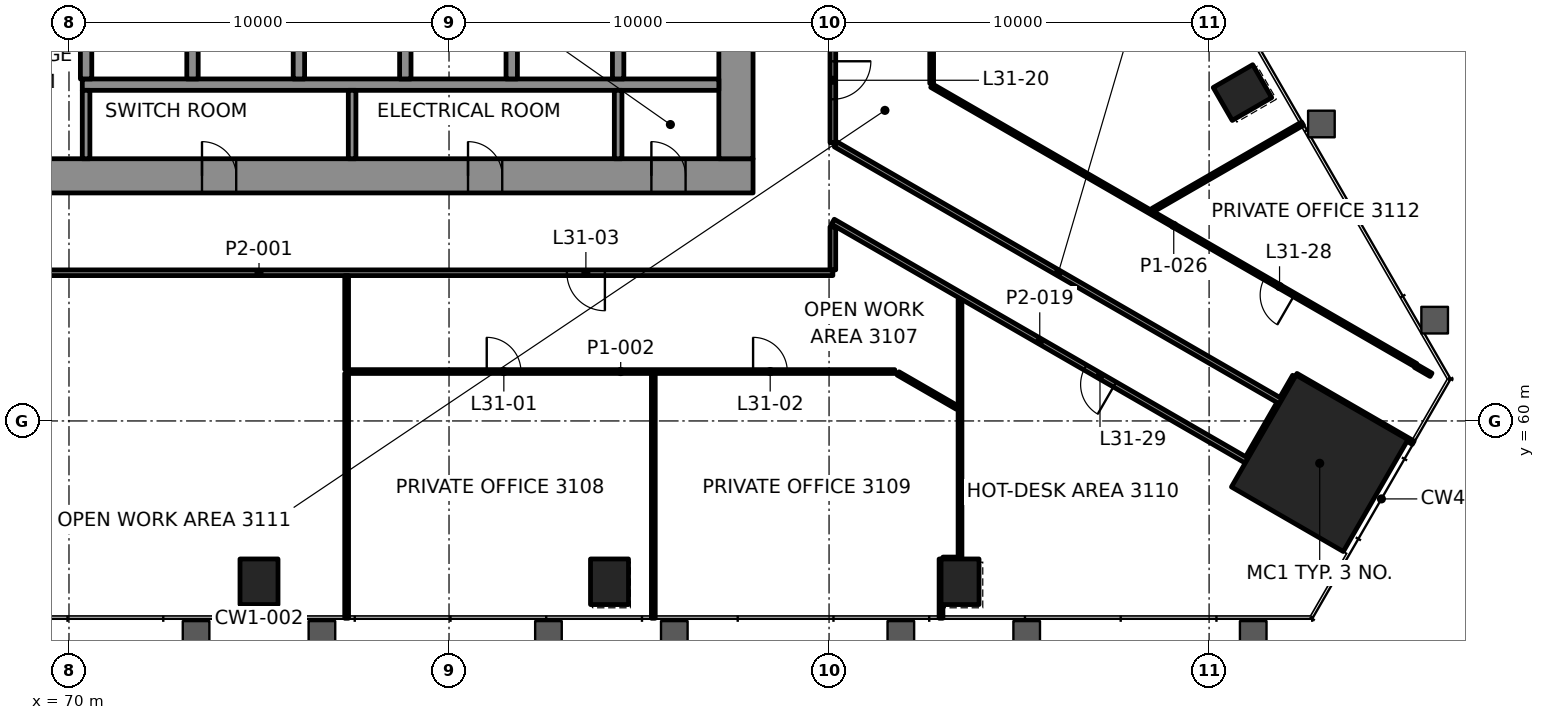
"""IFC4 building model, lengths in metres.
Left out: names, types, materials, properties, quantities, classifications, styles, units other than length and angle.
Written with IfcOpenShell. Run it as: python <this file> out.ifc"""

import sys

from ifc_helpers import new_model, si_unit, direction, frame, frame_2d, origin, origin_2d, place, context, subcontext, project, spatial, rectangle, extrude, element, fill, save


model = new_model("IFC4")
c1 = context("Model", 3, precision=1e-05, world=origin(), true_north=direction((0.0, 1.0)))
c2 = subcontext(c1, "Body", "Model", "MODEL_VIEW")
j1 = project(units=[si_unit("LENGTHUNIT", "METRE"), si_unit("PLANEANGLEUNIT", "RADIAN")], contexts=[c1])
p1 = place(None, origin())
s1 = spatial("IfcSite", under=j1, at=p1, CompositionType="ELEMENT")
p2 = place(p1, origin())
s2 = spatial("IfcBuilding", under=s1, at=p2, CompositionType="ELEMENT")
p3 = place(p2, frame((0.0, 0.0, 136.6)))
s3 = spatial("IfcBuildingStorey", under=s2, at=p3, CompositionType="ELEMENT", Elevation=136.6)
p4 = place(p3, frame((102.911, 58.886, 0.0), z_axis=(0.0, 0.0, 1.0), x_axis=(0.5, 0.866025403784, 0.0)))
e1 = element("IfcColumn", 1, at=p4, inside=s3, PredefinedType="COLUMN", context=c2, shape_type="SweptSolid", body=[
    extrude(rectangle(XDim=3.4, YDim=3.4, at=origin_2d()), origin(), (0.0, 0.0, 1.0), 4.2),
])
for number, where, z_axis, x_axis in (
    (2, (75.0, 55.768, -0.0), (0.0, 0.0, 1.0), (1.0, 0.0, 0.0)),
    (3, (84.223, 55.768, -0.0), (0.0, 0.0, 1.0), (1.0, 0.0, 0.0)),
    (4, (93.446, 55.768, -0.0), (0.0, 0.0, 1.0), (1.0, 0.0, 0.0)),
    (5, (100.878, 68.641, -0.0), (0.0, 0.0, 1.0), (-0.5, 0.866, 0.0)),
):
    element("IfcColumn", number, at=place(p3, frame(where, z_axis=z_axis, x_axis=x_axis)), inside=s3, PredefinedType="COLUMN", context=c2, shape_type="SweptSolid", body=[
        extrude(rectangle(XDim=1.0, YDim=1.2, at=origin_2d()), origin(), (0.0, 0.0, 1.0), 4.2),
    ])
p5 = place(p3, frame((62.0, 66.45, 0.0), z_axis=(0.0, 0.0, 1.0), x_axis=(1.0, 0.0, 0.0)))
e6 = element("IfcWall", 6, at=p5, inside=s3, PredefinedType="SHEAR", context=c2, shape_type="SweptSolid", body=[
    extrude(rectangle(XDim=26.0, YDim=0.9, at=frame_2d((13.0, 0.0))), origin(), (0.0, 0.0, 1.0), 3.9),
])
p6 = place(p5, frame((3.45, 0.0, 0.0)))
e7 = element("IfcOpeningElement", 7, at=p6, cuts=e6, PredefinedType="OPENING", context=c2, shape_type="SweptSolid", body=[
    extrude(rectangle(XDim=0.9, YDim=2.1, at=frame_2d((0.45, 1.05))), frame((0.0, 0.46, 0.0), z_axis=(0.0, -1.0, 0.0), x_axis=(1.0, 0.0, 0.0)), (0.0, 0.0, 1.0), 0.92),
])
p7 = place(p5, frame((6.425, 0.0, 0.0)))
e8 = element("IfcOpeningElement", 8, at=p7, cuts=e6, PredefinedType="OPENING", context=c2, shape_type="SweptSolid", body=[
    extrude(rectangle(XDim=0.9, YDim=2.1, at=frame_2d((0.45, 1.05))), frame((0.0, 0.46, 0.0), z_axis=(0.0, -1.0, 0.0), x_axis=(1.0, 0.0, 0.0)), (0.0, 0.0, 1.0), 0.92),
])
p8 = place(p5, frame((11.5, 0.0, 0.0)))
e9 = element("IfcOpeningElement", 9, at=p8, cuts=e6, PredefinedType="OPENING", context=c2, shape_type="SweptSolid", body=[
    extrude(rectangle(XDim=0.9, YDim=2.1, at=frame_2d((0.45, 1.05))), frame((0.0, 0.46, 0.0), z_axis=(0.0, -1.0, 0.0), x_axis=(1.0, 0.0, 0.0)), (0.0, 0.0, 1.0), 0.92),
])
p9 = place(p5, frame((18.5, 0.0, 0.0)))
e10 = element("IfcOpeningElement", 10, at=p9, cuts=e6, PredefinedType="OPENING", context=c2, shape_type="SweptSolid", body=[
    extrude(rectangle(XDim=0.9, YDim=2.1, at=frame_2d((0.45, 1.05))), frame((0.0, 0.46, 0.0), z_axis=(0.0, -1.0, 0.0), x_axis=(1.0, 0.0, 0.0)), (0.0, 0.0, 1.0), 0.92),
])
p10 = place(p5, frame((23.325, 0.0, 0.0)))
e11 = element("IfcOpeningElement", 11, at=p10, cuts=e6, PredefinedType="OPENING", context=c2, shape_type="SweptSolid", body=[
    extrude(rectangle(XDim=0.9, YDim=2.1, at=frame_2d((0.45, 1.05))), frame((0.0, 0.46, 0.0), z_axis=(0.0, -1.0, 0.0), x_axis=(1.0, 0.0, 0.0)), (0.0, 0.0, 1.0), 0.92),
])
p11 = place(p3, frame((87.55, 66.9, 0.0), z_axis=(0.0, 0.0, 1.0), x_axis=(0.0, 1.0, 0.0)))
e12 = element("IfcWall", 12, at=p11, inside=s3, PredefinedType="SHEAR", context=c2, shape_type="SweptSolid", body=[
    extrude(rectangle(XDim=16.2, YDim=0.9, at=frame_2d((8.1, 0.0))), origin(), (0.0, 0.0, 1.0), 3.9),
])
p12 = place(p11, frame((5.5, 0.0, 0.0)))
e13 = element("IfcOpeningElement", 13, at=p12, cuts=e12, PredefinedType="OPENING", context=c2, shape_type="SweptSolid", body=[
    extrude(rectangle(XDim=1.8, YDim=2.1, at=frame_2d((0.9, 1.05))), frame((0.0, 0.46, 0.0), z_axis=(0.0, -1.0, 0.0), x_axis=(1.0, 0.0, 0.0)), (0.0, 0.0, 1.0), 0.92),
])
p13 = place(p11, frame((12.272, 0.0, 0.0)))
e14 = element("IfcOpeningElement", 14, at=p13, cuts=e12, PredefinedType="OPENING", context=c2, shape_type="SweptSolid", body=[
    extrude(rectangle(XDim=0.9, YDim=2.1, at=frame_2d((0.45, 1.05))), frame((0.0, 0.46, 0.0), z_axis=(0.0, -1.0, 0.0), x_axis=(1.0, 0.0, 0.0)), (0.0, 0.0, 1.0), 0.92),
])
p14 = place(p3, frame((70.35, 68.85, 0.0), z_axis=(0.0, 0.0, 1.0), x_axis=(1.0, 0.0, 0.0)))
e15 = element("IfcWall", 15, at=p14, inside=s3, PredefinedType="SHEAR", context=c2, shape_type="SweptSolid", body=[
    extrude(rectangle(XDim=16.75, YDim=0.3, at=frame_2d((8.375, 0.0))), origin(), (0.0, 0.0, 1.0), 3.9),
])
for number, where, z_axis, x_axis in (
    (16, (70.45, 69.0, 0.0), (0.0, 0.0, 1.0), (0.0, 1.0, 0.0)),
    (17, (73.25, 69.0, 0.0), (0.0, 0.0, 1.0), (0.0, 1.0, 0.0)),
    (18, (76.05, 69.0, 0.0), (0.0, 0.0, 1.0), (0.0, 1.0, 0.0)),
    (19, (78.85, 69.0, 0.0), (0.0, 0.0, 1.0), (0.0, 1.0, 0.0)),
    (20, (81.65, 69.0, 0.0), (0.0, 0.0, 1.0), (0.0, 1.0, 0.0)),
    (21, (84.45, 69.0, 0.0), (0.0, 0.0, 1.0), (0.0, 1.0, 0.0)),
):
    element("IfcWall", number, at=place(p3, frame(where, z_axis=z_axis, x_axis=x_axis)), inside=s3, PredefinedType="SHEAR", context=c2, shape_type="SweptSolid", body=[
        extrude(rectangle(XDim=2.6, YDim=0.3, at=frame_2d((1.3, 0.0))), origin(), (0.0, 0.0, 1.0), 3.9),
    ])
p15 = place(p3, frame((92.997, 56.368, 0.0), z_axis=(0.0, 0.0, 1.0), x_axis=(1.0, 0.0, 0.0)))
e22 = element("IfcWall", 22, at=p15, inside=s3, PredefinedType="PARTITIONING", context=c2, shape_type="SweptSolid", body=[
    extrude(rectangle(XDim=0.399, YDim=0.1, at=frame_2d((0.199, 0.0))), origin(), (0.0, 0.0, 1.0), 3.3),
])
p16 = place(p3, frame((77.306, 61.3, 0.0), z_axis=(0.0, 0.0, 1.0), x_axis=(1.0, 0.0, 0.0)))
e23 = element("IfcWall", 23, at=p16, inside=s3, PredefinedType="PARTITIONING", context=c2, shape_type="SweptSolid", body=[
    extrude(rectangle(XDim=14.423, YDim=0.1, at=frame_2d((7.211, 0.0))), origin(), (0.0, 0.0, 1.0), 3.3),
])
p17 = place(p16, frame((3.687, 0.0, 0.0)))
e24 = element("IfcOpeningElement", 24, at=p17, cuts=e23, PredefinedType="OPENING", context=c2, shape_type="SweptSolid", body=[
    extrude(rectangle(XDim=0.9, YDim=2.1, at=frame_2d((0.45, 1.05))), frame((0.0, 0.06, 0.0), z_axis=(0.0, -1.0, 0.0), x_axis=(1.0, 0.0, 0.0)), (0.0, 0.0, 1.0), 0.12),
])
p18 = place(p16, frame((10.695, 0.0, 0.0)))
e25 = element("IfcOpeningElement", 25, at=p18, cuts=e23, PredefinedType="OPENING", context=c2, shape_type="SweptSolid", body=[
    extrude(rectangle(XDim=0.9, YDim=2.1, at=frame_2d((0.45, 1.05))), frame((0.0, 0.06, 0.0), z_axis=(0.0, -1.0, 0.0), x_axis=(1.0, 0.0, 0.0)), (0.0, 0.0, 1.0), 0.12),
])
p19 = place(p3, frame((90.1, 63.9, 0.0), z_axis=(0.0, 0.0, 1.0), x_axis=(-1.0, 0.0, 0.0)))
e26 = element("IfcWall", 26, at=p19, inside=s3, PredefinedType="PARTITIONING", context=c2, shape_type="SweptSolid", body=[
    extrude(rectangle(XDim=30.199, YDim=0.15, at=frame_2d((15.1, 0.0))), origin(), (0.0, 0.0, 1.0), 3.3),
])
p20 = place(p19, frame((5.999, 0.0, 0.0)))
e27 = element("IfcOpeningElement", 27, at=p20, cuts=e26, PredefinedType="OPENING", context=c2, shape_type="SweptSolid", body=[
    extrude(rectangle(XDim=1.0, YDim=2.1, at=frame_2d((0.5, 1.05))), frame((0.0, 0.085, 0.0), z_axis=(0.0, -1.0, 0.0), x_axis=(1.0, 0.0, 0.0)), (0.0, 0.0, 1.0), 0.17),
])
p21 = place(p19, frame((20.795, 0.0, 0.0)))
e28 = element("IfcOpeningElement", 28, at=p21, cuts=e26, PredefinedType="OPENING", context=c2, shape_type="SweptSolid", body=[
    extrude(rectangle(XDim=1.2, YDim=2.1, at=frame_2d((0.6, 1.05))), frame((0.0, 0.085, 0.0), z_axis=(0.0, -1.0, 0.0), x_axis=(1.0, 0.0, 0.0)), (0.0, 0.0, 1.0), 0.17),
])
p22 = place(p3, frame((98.52, 65.55, 0.0), z_axis=(0.0, 0.0, 1.0), x_axis=(0.866021092682, 0.500007466975, 0.0)))
e29 = element("IfcWall", 29, at=p22, inside=s3, PredefinedType="PARTITIONING", context=c2, shape_type="SweptSolid", body=[
    extrude(rectangle(XDim=4.548, YDim=0.1, at=frame_2d((2.274, 0.0))), origin(), (0.0, 0.0, 1.0), 3.3),
])
p23 = place(p3, frame((101.026, 59.022, 0.0), z_axis=(0.0, 0.0, 1.0), x_axis=(0.499991515992, 0.866030301974, 0.0)))
e30 = element("IfcWall", 30, at=p23, inside=s3, PredefinedType="PARTITIONING", context=c2, shape_type="SweptSolid", body=[
    extrude(rectangle(XDim=1.649, YDim=0.15, at=frame_2d((0.825, 0.0))), origin(), (0.0, 0.0, 1.0), 3.147),
])
p24 = place(p3, frame((93.446, 56.369, 0.0), z_axis=(0.0, 0.0, 1.0), x_axis=(0.0, 1.0, 0.0)))
e31 = element("IfcWall", 31, at=p24, inside=s3, PredefinedType="PARTITIONING", context=c2, shape_type="SweptSolid", body=[
    extrude(rectangle(XDim=6.825, YDim=0.1, at=frame_2d((3.413, 0.0))), origin(), (0.0, 0.0, 1.0), 3.3),
])
p25 = place(p3, frame((92.946, 54.808, 0.0), z_axis=(0.0, 0.0, 1.0), x_axis=(0.0, 1.0, 0.0)))
e32 = element("IfcWall", 32, at=p25, inside=s3, PredefinedType="PARTITIONING", context=c2, shape_type="SweptSolid", body=[
    extrude(rectangle(XDim=1.56, YDim=0.1, at=frame_2d((0.78, 0.0))), origin(), (0.0, 0.0, 1.0), 3.065),
])
p26 = place(p3, frame((92.7, 71.818, 0.0), z_axis=(0.0, 0.0, 1.0), x_axis=(0.0, -1.0, 0.0)))
e33 = element("IfcWall", 33, at=p26, inside=s3, PredefinedType="PARTITIONING", context=c2, shape_type="SweptSolid", body=[
    extrude(rectangle(XDim=2.938, YDim=0.1, at=frame_2d((1.469, 0.0))), origin(), (0.0, 0.0, 1.0), 3.3),
])
p27 = place(p26, frame((1.019, 0.0, 0.0)))
e34 = element("IfcOpeningElement", 34, at=p27, cuts=e33, PredefinedType="OPENING", context=c2, shape_type="SweptSolid", body=[
    extrude(rectangle(XDim=0.9, YDim=2.1, at=frame_2d((0.45, 1.05))), frame((0.0, 0.06, 0.0), z_axis=(0.0, -1.0, 0.0), x_axis=(1.0, 0.0, 0.0)), (0.0, 0.0, 1.0), 0.12),
])
p28 = place(p3, frame((90.1, 63.975, 0.0), z_axis=(0.0, 0.0, 1.0), x_axis=(0.0, 1.0, 0.0)))
e35 = element("IfcWall", 35, at=p28, inside=s3, PredefinedType="PARTITIONING", context=c2, shape_type="SweptSolid", body=[
    extrude(rectangle(XDim=1.131, YDim=0.15, at=frame_2d((0.565, 0.0))), origin(), (0.0, 0.0, 1.0), 3.147),
])
p29 = place(p3, frame((90.1, 86.1, 0.0), z_axis=(0.0, 0.0, 1.0), x_axis=(0.0, -1.0, 0.0)))
e36 = element("IfcWall", 36, at=p29, inside=s3, PredefinedType="PARTITIONING", context=c2, shape_type="SweptSolid", body=[
    extrude(rectangle(XDim=18.779, YDim=0.15, at=frame_2d((9.389, 0.0))), origin(), (0.0, 0.0, 1.0), 3.3),
])
p30 = place(p29, frame((0.083, 0.0, 0.0)))
e37 = element("IfcOpeningElement", 37, at=p30, cuts=e36, PredefinedType="OPENING", context=c2, shape_type="SweptSolid", body=[
    extrude(rectangle(XDim=0.8, YDim=2.1, at=frame_2d((0.4, 1.05))), frame((0.0, 0.085, 0.0), z_axis=(0.0, -1.0, 0.0), x_axis=(1.0, 0.0, 0.0)), (0.0, 0.0, 1.0), 0.17),
])
p31 = place(p29, frame((8.588, 0.0, 0.0)))
e38 = element("IfcOpeningElement", 38, at=p31, cuts=e36, PredefinedType="OPENING", context=c2, shape_type="SweptSolid", body=[
    extrude(rectangle(XDim=0.9, YDim=2.1, at=frame_2d((0.45, 1.05))), frame((0.0, 0.085, 0.0), z_axis=(0.0, -1.0, 0.0), x_axis=(1.0, 0.0, 0.0)), (0.0, 0.0, 1.0), 0.17),
])
p32 = place(p29, frame((16.635, 0.0, 0.0)))
e39 = element("IfcOpeningElement", 39, at=p32, cuts=e36, PredefinedType="OPENING", context=c2, shape_type="SweptSolid", body=[
    extrude(rectangle(XDim=1.0, YDim=2.1, at=frame_2d((0.5, 1.05))), frame((0.0, 0.085, 0.0), z_axis=(0.0, -1.0, 0.0), x_axis=(1.0, 0.0, 0.0)), (0.0, 0.0, 1.0), 0.17),
])
for number, where, z_axis, x_axis in (
    (40, (85.376, 54.808, 0.0), (0.0, 0.0, 1.0), (0.0, 1.0, 0.0)),
    (41, (77.306, 54.808, 0.0), (0.0, 0.0, 1.0), (0.0, 1.0, 0.0)),
):
    element("IfcWall", number, at=place(p3, frame(where, z_axis=z_axis, x_axis=x_axis)), inside=s3, PredefinedType="PARTITIONING", context=c2, shape_type="SweptSolid", body=[
        extrude(rectangle(XDim=6.442, YDim=0.1, at=frame_2d((3.221, 0.0))), origin(), (0.0, 0.0, 1.0), 3.065),
    ])
p33 = place(p3, frame((105.439, 61.467, 0.0), z_axis=(0.0, 0.0, 1.0), x_axis=(-0.866023351286, 0.500003555014, 0.0)))
e42 = element("IfcWall", 42, at=p33, inside=s3, PredefinedType="PARTITIONING", context=c2, shape_type="SweptSolid", body=[
    extrude(rectangle(XDim=14.71, YDim=0.1, at=frame_2d((7.355, 0.0))), origin(), (0.0, 0.0, 1.0), 3.3),
])
p34 = place(p33, frame((3.69, 0.0, 0.0)))
e43 = element("IfcOpeningElement", 43, at=p34, cuts=e42, PredefinedType="OPENING", context=c2, shape_type="SweptSolid", body=[
    extrude(rectangle(XDim=0.9, YDim=2.1, at=frame_2d((0.45, 1.05))), frame((0.0, 0.06, 0.0), z_axis=(0.0, -1.0, 0.0), x_axis=(1.0, 0.0, 0.0)), (0.0, 0.0, 1.0), 0.12),
])
p35 = place(p3, frame((105.84, 61.214, 0.0), z_axis=(0.0, 0.0, 1.0), x_axis=(-0.866108284413, 0.499856419056, 0.0)))
e44 = element("IfcWall", 44, at=p35, inside=s3, PredefinedType="PARTITIONING", context=c2, shape_type="SweptSolid", body=[
    extrude(rectangle(XDim=0.473, YDim=0.1, at=frame_2d((0.237, 0.0))), origin(), (0.0, 0.0, 1.0), 3.3),
])
p36 = place(p3, frame((105.371, 59.427, 0.0), z_axis=(0.0, 0.0, 1.0), x_axis=(-0.866014251095, 0.500019316528, 0.0)))
e45 = element("IfcWall", 45, at=p36, inside=s3, PredefinedType="PARTITIONING", context=c2, shape_type="SweptSolid", body=[
    extrude(rectangle(XDim=3.559, YDim=0.1, at=frame_2d((1.78, 0.0))), origin(), (0.0, 0.0, 1.0), 3.3),
])
p37 = place(p3, frame((101.888, 60.515, 0.0), z_axis=(0.0, 0.0, 1.0), x_axis=(-0.866026273051, 0.499998494383, 0.0)))
e46 = element("IfcWall", 46, at=p37, inside=s3, PredefinedType="PARTITIONING", context=c2, shape_type="SweptSolid", body=[
    extrude(rectangle(XDim=13.525, YDim=0.15, at=frame_2d((6.763, 0.0))), origin(), (0.0, 0.0, 1.0), 3.3),
])
p38 = place(p3, frame((100.988, 58.957, 0.0), z_axis=(0.0, 0.0, 1.0), x_axis=(-0.866021305353, 0.500007098624, 0.0)))
e47 = element("IfcWall", 47, at=p38, inside=s3, PredefinedType="PARTITIONING", context=c2, shape_type="SweptSolid", body=[
    extrude(rectangle(XDim=12.572, YDim=0.15, at=frame_2d((6.286, 0.0))), origin(), (0.0, 0.0, 1.0), 3.147),
])
p39 = place(p38, frame((4.006, 0.0, 0.0)))
e48 = element("IfcOpeningElement", 48, at=p39, cuts=e47, PredefinedType="OPENING", context=c2, shape_type="SweptSolid", body=[
    extrude(rectangle(XDim=0.9, YDim=2.1, at=frame_2d((0.45, 1.05))), frame((0.0, 0.085, 0.0), z_axis=(0.0, -1.0, 0.0), x_axis=(1.0, 0.0, 0.0)), (0.0, 0.0, 1.0), 0.17),
])
p40 = place(p3, frame((93.37, 60.353, 0.0), z_axis=(0.0, 0.0, 1.0), x_axis=(-0.866058764138, 0.49994221372, 0.0)))
e49 = element("IfcWall", 49, at=p40, inside=s3, PredefinedType="PARTITIONING", context=c2, shape_type="SweptSolid", body=[
    extrude(rectangle(XDim=1.795, YDim=0.1, at=frame_2d((0.897, 0.0))), origin(), (0.0, 0.0, 1.0), 3.3),
])
p41 = place(p3, frame((77.306, 61.35, 0.0), z_axis=(0.0, 0.0, 1.0), x_axis=(0.0, 1.0, 0.0)))
e50 = element("IfcWall", 50, at=p41, inside=s3, PredefinedType="PARTITIONING", context=c2, shape_type="SweptSolid", body=[
    extrude(rectangle(XDim=2.475, YDim=0.1, at=frame_2d((1.237, 0.0))), origin(), (0.0, 0.0, 1.0), 3.3),
])
p42 = place(p3, frame((101.926, 60.58, 0.0), z_axis=(0.0, 0.0, 1.0), x_axis=(0.50015088144, 0.865938274818, 0.0)))
e51 = element("IfcWall", 51, at=p42, inside=s3, PredefinedType="PARTITIONING", context=c2, shape_type="SweptSolid", body=[
    extrude(rectangle(XDim=0.674, YDim=0.15, at=frame_2d((0.337, 0.0))), origin(), (0.0, 0.0, 1.0), 3.3),
])
for number, where, z_axis, x_axis in (
    (52, (70.45, 66.9, 0.0), (0.0, 0.0, 1.0), (0.0, 1.0, 0.0)),
    (53, (77.45, 66.9, 0.0), (0.0, 0.0, 1.0), (0.0, 1.0, 0.0)),
    (54, (84.45, 66.9, 0.0), (0.0, 0.0, 1.0), (0.0, 1.0, 0.0)),
):
    element("IfcWall", number, at=place(p3, frame(where, z_axis=z_axis, x_axis=x_axis)), inside=s3, PredefinedType="PARTITIONING", context=c2, shape_type="SweptSolid", body=[
        extrude(rectangle(XDim=1.8, YDim=0.2, at=frame_2d((0.9, 0.0))), origin(), (0.0, 0.0, 1.0), 3.9),
    ])
p43 = place(p17, origin())
e55 = element("IfcDoor", 55, at=p43, inside=s3, OperationType="SINGLE_SWING_LEFT", PredefinedType="DOOR", context=c2, shape_type="SweptSolid", body=[
    extrude(rectangle(XDim=0.9, YDim=2.1, at=frame_2d((0.45, 1.05))), frame((0.0, 0.025, 0.0), z_axis=(0.0, -1.0, 0.0), x_axis=(1.0, 0.0, 0.0)), (0.0, 0.0, 1.0), 0.05),
])
fill(e24, e55)
p44 = place(p18, origin())
e56 = element("IfcDoor", 56, at=p44, inside=s3, OperationType="SINGLE_SWING_RIGHT", PredefinedType="DOOR", context=c2, shape_type="SweptSolid", body=[
    extrude(rectangle(XDim=0.9, YDim=2.1, at=frame_2d((0.45, 1.05))), frame((0.0, 0.025, 0.0), z_axis=(0.0, -1.0, 0.0), x_axis=(1.0, 0.0, 0.0)), (0.0, 0.0, 1.0), 0.05),
])
fill(e25, e56)
p45 = place(p20, origin())
e57 = element("IfcDoor", 57, at=p45, inside=s3, OperationType="SINGLE_SWING_LEFT", PredefinedType="DOOR", context=c2, shape_type="SweptSolid", body=[
    extrude(rectangle(XDim=1.0, YDim=2.1, at=frame_2d((0.5, 1.05))), frame((0.0, 0.025, 0.0), z_axis=(0.0, -1.0, 0.0), x_axis=(1.0, 0.0, 0.0)), (0.0, 0.0, 1.0), 0.05),
])
fill(e27, e57)
p46 = place(p32, origin())
e58 = element("IfcDoor", 58, at=p46, inside=s3, OperationType="SINGLE_SWING_LEFT", PredefinedType="DOOR", context=c2, shape_type="SweptSolid", body=[
    extrude(rectangle(XDim=1.0, YDim=2.1, at=frame_2d((0.5, 1.05))), frame((0.0, 0.025, 0.0), z_axis=(0.0, -1.0, 0.0), x_axis=(1.0, 0.0, 0.0)), (0.0, 0.0, 1.0), 0.05),
])
fill(e39, e58)
p47 = place(p34, origin())
e59 = element("IfcDoor", 59, at=p47, inside=s3, OperationType="SINGLE_SWING_LEFT", PredefinedType="DOOR", context=c2, shape_type="SweptSolid", body=[
    extrude(rectangle(XDim=0.9, YDim=2.1, at=frame_2d((0.45, 1.05))), frame((0.0, 0.025, 0.0), z_axis=(0.0, -1.0, 0.0), x_axis=(1.0, 0.0, 0.0)), (0.0, 0.0, 1.0), 0.05),
])
fill(e43, e59)
p48 = place(p39, origin())
e60 = element("IfcDoor", 60, at=p48, inside=s3, OperationType="SINGLE_SWING_LEFT", PredefinedType="DOOR", context=c2, shape_type="SweptSolid", body=[
    extrude(rectangle(XDim=0.9, YDim=2.1, at=frame_2d((0.45, 1.05))), frame((0.0, 0.025, 0.0), z_axis=(0.0, -1.0, 0.0), x_axis=(1.0, 0.0, 0.0)), (0.0, 0.0, 1.0), 0.05),
])
fill(e48, e60)
p49 = place(p8, origin())
e61 = element("IfcDoor", 61, at=p49, inside=s3, OperationType="SINGLE_SWING_LEFT", PredefinedType="DOOR", context=c2, shape_type="SweptSolid", body=[
    extrude(rectangle(XDim=0.9, YDim=2.1, at=frame_2d((0.45, 1.05))), frame((0.0, 0.17, 0.0), z_axis=(0.0, -1.0, 0.0), x_axis=(1.0, 0.0, 0.0)), (0.0, 0.0, 1.0), 0.34),
])
fill(e9, e61)
p50 = place(p9, origin())
e62 = element("IfcDoor", 62, at=p50, inside=s3, OperationType="SINGLE_SWING_RIGHT", PredefinedType="DOOR", context=c2, shape_type="SweptSolid", body=[
    extrude(rectangle(XDim=0.9, YDim=2.1, at=frame_2d((0.45, 1.05))), frame((0.0, 0.17, 0.0), z_axis=(0.0, -1.0, 0.0), x_axis=(1.0, 0.0, 0.0)), (0.0, 0.0, 1.0), 0.34),
])
fill(e10, e62)
p51 = place(p10, origin())
e63 = element("IfcDoor", 63, at=p51, inside=s3, OperationType="SINGLE_SWING_LEFT", PredefinedType="DOOR", context=c2, shape_type="SweptSolid", body=[
    extrude(rectangle(XDim=0.9, YDim=2.1, at=frame_2d((0.45, 1.05))), frame((0.0, 0.17, 0.0), z_axis=(0.0, -1.0, 0.0), x_axis=(1.0, 0.0, 0.0)), (0.0, 0.0, 1.0), 0.34),
])
fill(e11, e63)
save(model, sys.argv[1])
